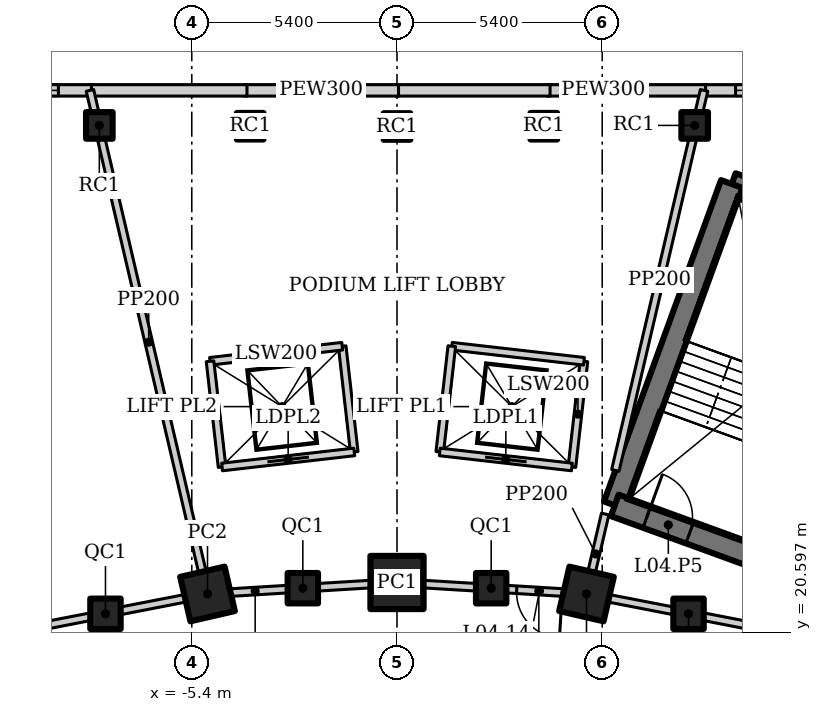
"""IFC4 building model, lengths in metres.
Left out: names, types, materials, properties, quantities, classifications, styles, units other than length and angle.
Written with IfcOpenShell. Run it as: python <this file> out.ifc"""

import sys

from ifc_helpers import new_model, si_unit, direction, frame, frame_2d, origin, origin_2d, place, context, subcontext, project, spatial, rectangle, hollow_rectangle, extrude, element, fill, save


model = new_model("IFC4")
c1 = context("Model", 3, precision=1e-05, world=origin(), true_north=direction((0.0, 1.0)))
c2 = subcontext(c1, "Body", "Model", "MODEL_VIEW")
j1 = project(units=[si_unit("LENGTHUNIT", "METRE"), si_unit("PLANEANGLEUNIT", "RADIAN")], contexts=[c1])
p1 = place(None, origin())
s1 = spatial("IfcSite", under=j1, at=p1, CompositionType="ELEMENT")
p2 = place(p1, origin())
s2 = spatial("IfcBuilding", under=s1, at=p2, CompositionType="ELEMENT")
p3 = place(p2, frame((0.0, 0.0, 27.0)))
s3 = spatial("IfcBuildingStorey", under=s2, at=p3, CompositionType="ELEMENT", Elevation=27.0)
p4 = place(p3, frame((4.986, 21.598, 0.0), z_axis=(0.0, 0.0, 1.0), x_axis=(0.224951054344, 0.974370064785, 0.0)))
e1 = element("IfcColumn", 1, at=p4, inside=s3, PredefinedType="COLUMN", context=c2, shape_type="SweptSolid", body=[
    extrude(hollow_rectangle(XDim=1.2, YDim=1.2, WallThickness=0.1, at=origin_2d()), origin(), (0.0, 0.0, 1.0), 5.0),
])
p5 = place(p3, frame((0.0, 21.9, 0.0), z_axis=(0.0, 0.0, 1.0), x_axis=(1.0, 0.0, 0.0)))
e2 = element("IfcColumn", 2, at=p5, inside=s3, PredefinedType="COLUMN", context=c2, shape_type="SweptSolid", body=[
    extrude(hollow_rectangle(XDim=1.4, YDim=1.4, WallThickness=0.1, at=origin_2d()), origin(), (0.0, 0.0, 1.0), 5.0),
])
p6 = place(p3, frame((-4.986, 21.598, 0.0), z_axis=(0.0, 0.0, 1.0), x_axis=(0.974370064785, 0.224951054344, 0.0)))
e3 = element("IfcColumn", 3, at=p6, inside=s3, PredefinedType="COLUMN", context=c2, shape_type="SweptSolid", body=[
    extrude(hollow_rectangle(XDim=1.2, YDim=1.2, WallThickness=0.1, at=origin_2d()), origin(), (0.0, 0.0, 1.0), 5.0),
])
for number, where, z_axis, x_axis in (
    (4, (7.671, 21.076, 0.0), (0.0, 0.0, 1.0), (1.0, 0.0, 0.0)),
    (5, (2.478, 21.75, 0.0), (0.0, 0.0, 1.0), (1.0, 0.0, 0.0)),
    (6, (-2.478, 21.75, 0.0), (0.0, 0.0, 1.0), (1.0, 0.0, 0.0)),
    (7, (-7.671, 21.076, 0.0), (0.0, 0.0, 1.0), (1.0, 0.0, 0.0)),
):
    element("IfcColumn", number, at=place(p3, frame(where, z_axis=z_axis, x_axis=x_axis)), inside=s3, PredefinedType="COLUMN", context=c2, shape_type="SweptSolid", body=[
        extrude(hollow_rectangle(XDim=0.8, YDim=0.8, WallThickness=0.05, at=origin_2d()), origin(), (0.0, 0.0, 1.0), 4.8),
    ])
for number, where, z_axis, x_axis in (
    (8, (3.863, 33.907, 0.0), (0.0, 0.0, 1.0), (1.0, 0.0, 0.0)),
    (9, (-3.863, 33.907, 0.0), (0.0, 0.0, 1.0), (1.0, 0.0, 0.0)),
    (10, (7.833, 33.928, 0.0), (0.0, 0.0, 1.0), (1.0, 0.0, 0.0)),
    (11, (0.0, 33.9, 0.0), (0.0, 0.0, 1.0), (1.0, 0.0, 0.0)),
    (12, (-7.833, 33.928, 0.0), (0.0, 0.0, 1.0), (1.0, 0.0, 0.0)),
):
    element("IfcColumn", number, at=place(p3, frame(where, z_axis=z_axis, x_axis=x_axis)), inside=s3, PredefinedType="COLUMN", context=c2, shape_type="SweptSolid", body=[
        extrude(hollow_rectangle(XDim=0.7, YDim=0.7, WallThickness=0.04, at=origin_2d()), origin(), (0.0, 0.0, 1.0), 4.8),
    ])
p7 = place(p3, frame((12.779, 34.85, 0.0), z_axis=(0.0, 0.0, 1.0), x_axis=(-1.0, 0.0, 0.0)))
e13 = element("IfcWall", 13, at=p7, inside=s3, PredefinedType="SOLIDWALL", context=c2, shape_type="SweptSolid", body=[
    extrude(rectangle(XDim=4.739, YDim=0.3, at=frame_2d((2.369, 0.0))), origin(), (0.0, 0.0, 1.0), 4.8),
])
p8 = place(p7, frame((0.869, 0.0, 0.9)))
e14 = element("IfcOpeningElement", 14, at=p8, cuts=e13, PredefinedType="OPENING", context=c2, shape_type="SweptSolid", body=[
    extrude(rectangle(XDim=3.0, YDim=2.0, at=frame_2d((1.5, 1.0))), frame((0.0, 0.16, 0.0), z_axis=(0.0, -1.0, 0.0), x_axis=(1.0, 0.0, 0.0)), (0.0, 0.0, 1.0), 0.32),
])
p9 = place(p3, frame((8.12, 34.85, 0.0), z_axis=(0.0, 0.0, 1.0), x_axis=(-1.0, 0.0, 0.0)))
e15 = element("IfcWall", 15, at=p9, inside=s3, PredefinedType="SOLIDWALL", context=c2, shape_type="SweptSolid", body=[
    extrude(rectangle(XDim=4.173, YDim=0.3, at=frame_2d((2.086, 0.0))), origin(), (0.0, 0.0, 1.0), 4.8),
])
for number, where, z_axis, x_axis in (
    (16, (4.028, 34.85, 0.0), (0.0, 0.0, 1.0), (-1.0, 0.0, 0.0)),
    (17, (0.04, 34.85, 0.0), (0.0, 0.0, 1.0), (-1.0, 0.0, 0.0)),
):
    element("IfcWall", number, at=place(p3, frame(where, z_axis=z_axis, x_axis=x_axis)), inside=s3, PredefinedType="SOLIDWALL", context=c2, shape_type="SweptSolid", body=[
        extrude(rectangle(XDim=4.068, YDim=0.3, at=frame_2d((2.034, 0.0))), origin(), (0.0, 0.0, 1.0), 4.8),
    ])
p10 = place(p3, frame((-3.948, 34.85, 0.0), z_axis=(0.0, 0.0, 1.0), x_axis=(-1.0, 0.0, 0.0)))
e18 = element("IfcWall", 18, at=p10, inside=s3, PredefinedType="SOLIDWALL", context=c2, shape_type="SweptSolid", body=[
    extrude(rectangle(XDim=4.173, YDim=0.3, at=frame_2d((2.086, 0.0))), origin(), (0.0, 0.0, 1.0), 4.8),
])
p11 = place(p3, frame((-8.04, 34.85, 0.0), z_axis=(0.0, 0.0, 1.0), x_axis=(-1.0, 0.0, 0.0)))
e19 = element("IfcWall", 19, at=p11, inside=s3, PredefinedType="SOLIDWALL", context=c2, shape_type="SweptSolid", body=[
    extrude(rectangle(XDim=4.739, YDim=0.3, at=frame_2d((2.369, 0.0))), origin(), (0.0, 0.0, 1.0), 4.8),
])
p12 = place(p11, frame((0.869, 0.0, 0.9)))
e20 = element("IfcOpeningElement", 20, at=p12, cuts=e19, PredefinedType="OPENING", context=c2, shape_type="SweptSolid", body=[
    extrude(rectangle(XDim=3.0, YDim=2.0, at=frame_2d((1.5, 1.0))), frame((0.0, 0.16, 0.0), z_axis=(0.0, -1.0, 0.0), x_axis=(1.0, 0.0, 0.0)), (0.0, 0.0, 1.0), 0.32),
])
p13 = place(p3, frame((10.463, 20.534, 0.0), z_axis=(0.0, 0.0, 1.0), x_axis=(-0.98163593748, 0.190763954266, 0.0)))
e21 = element("IfcWall", 21, at=p13, inside=s3, PredefinedType="SOLIDWALL", context=c2, shape_type="SweptSolid", body=[
    extrude(rectangle(XDim=2.844, YDim=0.2, at=frame_2d((1.422, 0.0))), origin(), (0.0, 0.0, 1.0), 4.338),
])
p14 = place(p3, frame((7.671, 21.076, 0.0), z_axis=(0.0, 0.0, 1.0), x_axis=(-0.981637218105, 0.190757364289, 0.0)))
e22 = element("IfcWall", 22, at=p14, inside=s3, PredefinedType="SOLIDWALL", context=c2, shape_type="SweptSolid", body=[
    extrude(rectangle(XDim=2.735, YDim=0.2, at=frame_2d((1.368, 0.0))), origin(), (0.0, 0.0, 1.0), 4.338),
])
p15 = place(p3, frame((4.986, 21.598, 0.0), z_axis=(0.0, 0.0, 1.0), x_axis=(-0.998172405641, 0.060430527186, 0.0)))
e23 = element("IfcWall", 23, at=p15, inside=s3, PredefinedType="SOLIDWALL", context=c2, shape_type="SweptSolid", body=[
    extrude(rectangle(XDim=2.513, YDim=0.2, at=frame_2d((1.256, 0.0))), origin(), (0.0, 0.0, 1.0), 4.338),
])
p16 = place(p15, frame((0.64, 0.0, 0.0)))
e24 = element("IfcOpeningElement", 24, at=p16, cuts=e23, PredefinedType="OPENING", context=c2, shape_type="SweptSolid", body=[
    extrude(rectangle(XDim=1.2, YDim=2.4, at=frame_2d((0.6, 1.2))), frame((0.0, 0.11, 0.0), z_axis=(0.0, -1.0, 0.0), x_axis=(1.0, 0.0, 0.0)), (0.0, 0.0, 1.0), 0.22),
])
for number, where, z_axis, x_axis in (
    (25, (2.478, 21.75, 0.0), (0.0, 0.0, 1.0), (-0.998, 0.06, 0.0)),
    (26, (0.0, 21.9, 0.0), (0.0, 0.0, 1.0), (-0.998, -0.06, 0.0)),
):
    element("IfcWall", number, at=place(p3, frame(where, z_axis=z_axis, x_axis=x_axis)), inside=s3, PredefinedType="SOLIDWALL", context=c2, shape_type="SweptSolid", body=[
        extrude(rectangle(XDim=2.483, YDim=0.2, at=frame_2d((1.241, 0.0))), origin(), (0.0, 0.0, 1.0), 4.302),
    ])
p17 = place(p3, frame((-2.478, 21.75, 0.0), z_axis=(0.0, 0.0, 1.0), x_axis=(-0.998172405641, -0.060430527186, 0.0)))
e27 = element("IfcWall", 27, at=p17, inside=s3, PredefinedType="SOLIDWALL", context=c2, shape_type="SweptSolid", body=[
    extrude(rectangle(XDim=2.513, YDim=0.2, at=frame_2d((1.256, 0.0))), origin(), (0.0, 0.0, 1.0), 4.394),
])
p18 = place(p3, frame((-4.986, 21.598, 0.0), z_axis=(0.0, 0.0, 1.0), x_axis=(-0.981637218105, -0.190757364289, 0.0)))
e28 = element("IfcWall", 28, at=p18, inside=s3, PredefinedType="SOLIDWALL", context=c2, shape_type="SweptSolid", body=[
    extrude(rectangle(XDim=2.735, YDim=0.2, at=frame_2d((1.368, 0.0))), origin(), (0.0, 0.0, 1.0), 4.302),
])
p19 = place(p3, frame((-7.671, 21.076, 0.0), z_axis=(0.0, 0.0, 1.0), x_axis=(-0.98163593748, -0.190763954266, 0.0)))
e29 = element("IfcWall", 29, at=p19, inside=s3, PredefinedType="SOLIDWALL", context=c2, shape_type="SweptSolid", body=[
    extrude(rectangle(XDim=2.844, YDim=0.2, at=frame_2d((1.422, 0.0))), origin(), (0.0, 0.0, 1.0), 4.394),
])
p20 = place(p3, frame((4.986, 21.598, 0.0), z_axis=(0.0, 0.0, 1.0), x_axis=(0.227351065365, 0.973812863479, 0.0)))
e30 = element("IfcWall", 30, at=p20, inside=s3, PredefinedType="SOLIDWALL", context=c2, shape_type="SweptSolid", body=[
    extrude(rectangle(XDim=2.161, YDim=0.2, at=frame_2d((1.08, 0.0))), origin(), (0.0, 0.0, 1.0), 2.8),
])
p21 = place(p3, frame((5.745, 24.849, 0.0), z_axis=(0.0, 0.0, 1.0), x_axis=(0.227353607936, 0.973812269875, 0.0)))
e31 = element("IfcWall", 31, at=p21, inside=s3, PredefinedType="SOLIDWALL", context=c2, shape_type="SweptSolid", body=[
    extrude(rectangle(XDim=10.27, YDim=0.2, at=frame_2d((5.135, 0.0))), origin(), (0.0, 0.0, 1.0), 2.8),
])
p22 = place(p3, frame((-4.986, 21.598, 0.0), z_axis=(0.0, 0.0, 1.0), x_axis=(-0.227360055616, 0.973810764528, 0.0)))
e32 = element("IfcWall", 32, at=p22, inside=s3, PredefinedType="SOLIDWALL", context=c2, shape_type="SweptSolid", body=[
    extrude(rectangle(XDim=13.608, YDim=0.2, at=frame_2d((6.804, 0.0))), origin(), (0.0, 0.0, 1.0), 3.878),
])
p23 = place(p3, frame((14.07, 30.471, 0.0), z_axis=(0.0, 0.0, 1.0), x_axis=(-0.939692822968, 0.342019587834, 0.0)))
e33 = element("IfcWall", 33, at=p23, inside=s3, PredefinedType="SHEAR", context=c2, shape_type="SweptSolid", body=[
    extrude(rectangle(XDim=5.6, YDim=0.6, at=frame_2d((2.8, 0.0))), origin(), (0.0, 0.0, 1.0), 5.0),
])
p24 = place(p3, frame((8.808, 32.387, 0.0), z_axis=(0.0, 0.0, 1.0), x_axis=(-0.3420218461, -0.939692001025, 0.0)))
e34 = element("IfcWall", 34, at=p24, inside=s3, PredefinedType="SHEAR", context=c2, shape_type="SweptSolid", body=[
    extrude(rectangle(XDim=9.0, YDim=0.6, at=frame_2d((4.5, 0.0))), origin(), (0.0, 0.0, 1.0), 5.0),
])
p25 = place(p3, frame((5.73, 23.93, 0.0), z_axis=(0.0, 0.0, 1.0), x_axis=(0.939678810556, -0.342058084236, 0.0)))
e35 = element("IfcWall", 35, at=p25, inside=s3, PredefinedType="SHEAR", context=c2, shape_type="SweptSolid", body=[
    extrude(rectangle(XDim=5.6, YDim=0.6, at=frame_2d((2.8, 0.0))), origin(), (0.0, 0.0, 1.0), 5.0),
])
p26 = place(p25, frame((0.9, 0.0, 0.0)))
e36 = element("IfcOpeningElement", 36, at=p26, cuts=e35, PredefinedType="OPENING", context=c2, shape_type="SweptSolid", body=[
    extrude(rectangle(XDim=1.2, YDim=2.1, at=frame_2d((0.6, 1.05))), frame((0.0, 0.31, 0.0), z_axis=(0.0, -1.0, 0.0), x_axis=(1.0, 0.0, 0.0)), (0.0, 0.0, 1.0), 0.62),
])
p27 = place(p3, frame((4.603, 24.939, 0.0), z_axis=(0.0, 0.0, 1.0), x_axis=(0.113177712989, 0.993574760792, 0.0)))
e37 = element("IfcWall", 37, at=p27, inside=s3, PredefinedType="SOLIDWALL", context=c2, shape_type="SweptSolid", body=[
    extrude(rectangle(XDim=2.8, YDim=0.2, at=frame_2d((1.4, 0.0))), origin(), (0.0, 0.0, 1.0), 4.8),
])
p28 = place(p3, frame((4.92, 27.721, 0.0), z_axis=(0.0, 0.0, 1.0), x_axis=(-0.993571061716, 0.113210182053, 0.0)))
e38 = element("IfcWall", 38, at=p28, inside=s3, PredefinedType="SOLIDWALL", context=c2, shape_type="SweptSolid", body=[
    extrude(rectangle(XDim=3.5, YDim=0.2, at=frame_2d((1.75, 0.0))), origin(), (0.0, 0.0, 1.0), 4.8),
])
p29 = place(p3, frame((1.442, 28.117, 0.0), z_axis=(0.0, 0.0, 1.0), x_axis=(-0.113177712989, -0.993574760792, 0.0)))
e39 = element("IfcWall", 39, at=p29, inside=s3, PredefinedType="SOLIDWALL", context=c2, shape_type="SweptSolid", body=[
    extrude(rectangle(XDim=2.8, YDim=0.2, at=frame_2d((1.4, 0.0))), origin(), (0.0, 0.0, 1.0), 4.8),
])
p30 = place(p3, frame((1.125, 25.335, 0.0), z_axis=(0.0, 0.0, 1.0), x_axis=(0.993571061716, -0.113210182053, 0.0)))
e40 = element("IfcWall", 40, at=p30, inside=s3, PredefinedType="SOLIDWALL", context=c2, shape_type="SweptSolid", body=[
    extrude(rectangle(XDim=3.5, YDim=0.2, at=frame_2d((1.75, 0.0))), origin(), (0.0, 0.0, 1.0), 4.8),
])
p31 = place(p30, frame((1.2, 0.0, 0.0)))
e41 = element("IfcOpeningElement", 41, at=p31, cuts=e40, PredefinedType="OPENING", context=c2, shape_type="SweptSolid", body=[
    extrude(rectangle(XDim=1.1, YDim=2.2, at=frame_2d((0.55, 1.1))), frame((0.0, 0.11, 0.0), z_axis=(0.0, -1.0, 0.0), x_axis=(1.0, 0.0, 0.0)), (0.0, 0.0, 1.0), 0.22),
])
p32 = place(p3, frame((-1.125, 25.335, 0.0), z_axis=(0.0, 0.0, 1.0), x_axis=(-0.113177712989, 0.993574760792, 0.0)))
e42 = element("IfcWall", 42, at=p32, inside=s3, PredefinedType="SOLIDWALL", context=c2, shape_type="SweptSolid", body=[
    extrude(rectangle(XDim=2.8, YDim=0.2, at=frame_2d((1.4, 0.0))), origin(), (0.0, 0.0, 1.0), 4.8),
])
p33 = place(p3, frame((-1.442, 28.117, 0.0), z_axis=(0.0, 0.0, 1.0), x_axis=(-0.993571061716, -0.113210182053, 0.0)))
e43 = element("IfcWall", 43, at=p33, inside=s3, PredefinedType="SOLIDWALL", context=c2, shape_type="SweptSolid", body=[
    extrude(rectangle(XDim=3.5, YDim=0.2, at=frame_2d((1.75, 0.0))), origin(), (0.0, 0.0, 1.0), 4.8),
])
p34 = place(p3, frame((-4.92, 27.721, 0.0), z_axis=(0.0, 0.0, 1.0), x_axis=(0.113177712989, -0.993574760792, 0.0)))
e44 = element("IfcWall", 44, at=p34, inside=s3, PredefinedType="SOLIDWALL", context=c2, shape_type="SweptSolid", body=[
    extrude(rectangle(XDim=2.8, YDim=0.2, at=frame_2d((1.4, 0.0))), origin(), (0.0, 0.0, 1.0), 4.8),
])
p35 = place(p3, frame((-4.603, 24.939, 0.0), z_axis=(0.0, 0.0, 1.0), x_axis=(0.993571061716, 0.113210182053, 0.0)))
e45 = element("IfcWall", 45, at=p35, inside=s3, PredefinedType="SOLIDWALL", context=c2, shape_type="SweptSolid", body=[
    extrude(rectangle(XDim=3.5, YDim=0.2, at=frame_2d((1.75, 0.0))), origin(), (0.0, 0.0, 1.0), 4.8),
])
p36 = place(p35, frame((1.2, 0.0, 0.0)))
e46 = element("IfcOpeningElement", 46, at=p36, cuts=e45, PredefinedType="OPENING", context=c2, shape_type="SweptSolid", body=[
    extrude(rectangle(XDim=1.1, YDim=2.2, at=frame_2d((0.55, 1.1))), frame((0.0, 0.11, 0.0), z_axis=(0.0, -1.0, 0.0), x_axis=(1.0, 0.0, 0.0)), (0.0, 0.0, 1.0), 0.22),
])
p37 = place(p8, origin())
e47 = element("IfcWindow", 47, at=p37, inside=s3, PartitioningType="SINGLE_PANEL", PredefinedType="WINDOW", context=c2, shape_type="SweptSolid", body=[
    extrude(rectangle(XDim=3.0, YDim=2.0, at=frame_2d((1.5, 1.0))), frame((0.0, 0.03, 0.0), z_axis=(0.0, -1.0, 0.0), x_axis=(1.0, 0.0, 0.0)), (0.0, 0.0, 1.0), 0.06),
])
fill(e14, e47)
p38 = place(p12, origin())
e48 = element("IfcWindow", 48, at=p38, inside=s3, PartitioningType="SINGLE_PANEL", PredefinedType="WINDOW", context=c2, shape_type="SweptSolid", body=[
    extrude(rectangle(XDim=3.0, YDim=2.0, at=frame_2d((1.5, 1.0))), frame((0.0, 0.03, 0.0), z_axis=(0.0, -1.0, 0.0), x_axis=(1.0, 0.0, 0.0)), (0.0, 0.0, 1.0), 0.06),
])
fill(e20, e48)
p39 = place(p16, origin())
e49 = element("IfcDoor", 49, at=p39, inside=s3, OperationType="SINGLE_SWING_RIGHT", PredefinedType="DOOR", context=c2, shape_type="SweptSolid", body=[
    extrude(rectangle(XDim=1.2, YDim=2.4, at=frame_2d((0.6, 1.2))), frame((0.0, 0.025, 0.0), z_axis=(0.0, -1.0, 0.0), x_axis=(1.0, 0.0, 0.0)), (0.0, 0.0, 1.0), 0.05),
])
fill(e24, e49)
p40 = place(p26, origin())
e50 = element("IfcDoor", 50, at=p40, inside=s3, OperationType="SINGLE_SWING_RIGHT", PredefinedType="DOOR", context=c2, shape_type="SweptSolid", body=[
    extrude(rectangle(XDim=1.2, YDim=2.1, at=frame_2d((0.6, 1.05))), frame((0.0, 0.025, 0.0), z_axis=(0.0, -1.0, 0.0), x_axis=(1.0, 0.0, 0.0)), (0.0, 0.0, 1.0), 0.05),
])
fill(e36, e50)
p41 = place(p31, origin())
e51 = element("IfcDoor", 51, at=p41, inside=s3, OperationType="DOUBLE_DOOR_SLIDING", PredefinedType="DOOR", context=c2, shape_type="SweptSolid", body=[
    extrude(rectangle(XDim=1.1, YDim=2.2, at=frame_2d((0.55, 1.1))), frame((0.0, 0.025, 0.0), z_axis=(0.0, -1.0, 0.0), x_axis=(1.0, 0.0, 0.0)), (0.0, 0.0, 1.0), 0.05),
])
fill(e41, e51)
p42 = place(p36, origin())
e52 = element("IfcDoor", 52, at=p42, inside=s3, OperationType="DOUBLE_DOOR_SLIDING", PredefinedType="DOOR", context=c2, shape_type="SweptSolid", body=[
    extrude(rectangle(XDim=1.1, YDim=2.2, at=frame_2d((0.55, 1.1))), frame((0.0, 0.025, 0.0), z_axis=(0.0, -1.0, 0.0), x_axis=(1.0, 0.0, 0.0)), (0.0, 0.0, 1.0), 0.05),
])
fill(e46, e52)
save(model, sys.argv[1])
